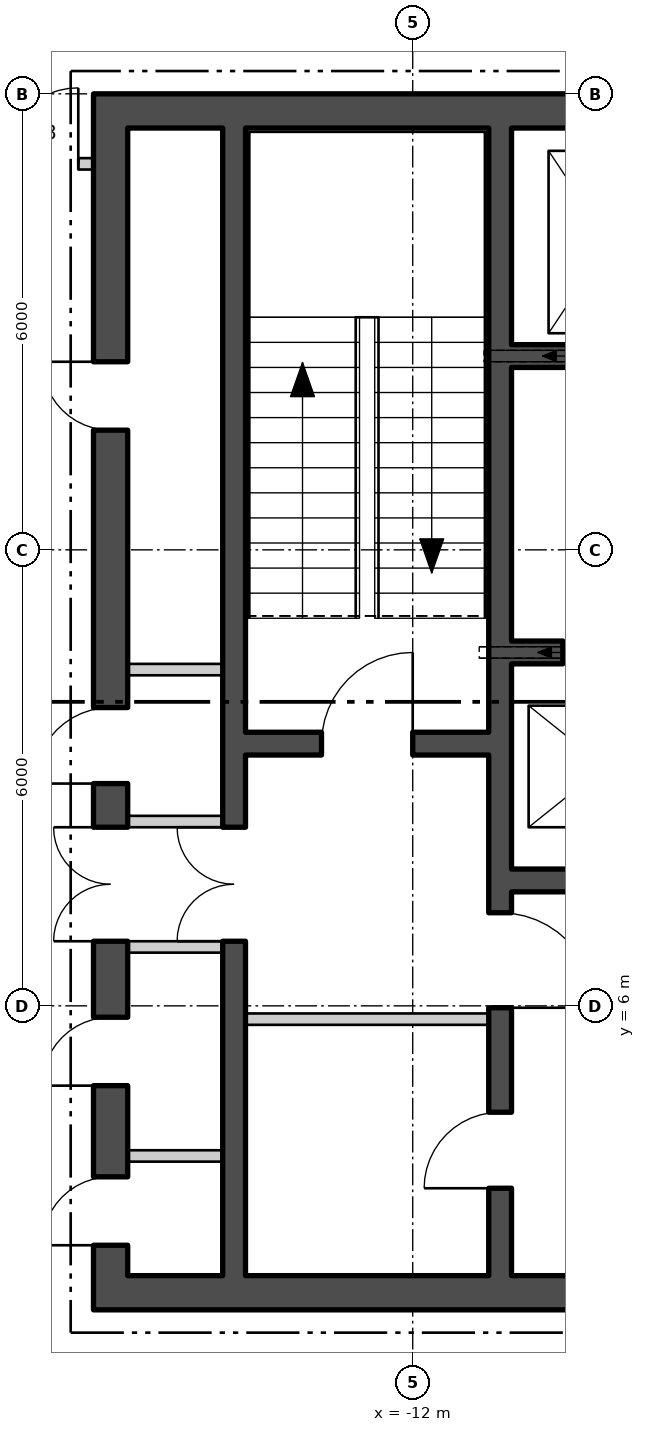
"""IFC4 building model, lengths in metres.
Left out: names, types, materials, properties, quantities, classifications, styles, units other than length and angle.
Written with IfcOpenShell. Run it as: python <this file> out.ifc"""

import sys

from ifc_helpers import new_model, si_unit, direction, frame, frame_2d, origin, place, context, subcontext, project, spatial, polyline, rectangle, outline, extrude, element, fill, save


model = new_model("IFC4")
c1 = context("Model", 3, precision=1e-05, world=origin(), true_north=direction((0.0, 1.0)))
c2 = subcontext(c1, "Body", "Model", "MODEL_VIEW")
j1 = project(units=[si_unit("LENGTHUNIT", "METRE"), si_unit("PLANEANGLEUNIT", "RADIAN")], contexts=[c1])
p1 = place(None, origin())
s1 = spatial("IfcSite", under=j1, at=p1, CompositionType="ELEMENT")
p2 = place(p1, origin())
s2 = spatial("IfcBuilding", under=s1, at=p2, CompositionType="ELEMENT")
p3 = place(p2, frame((0.0, 0.0, 216.0)))
s3 = spatial("IfcBuildingStorey", under=s2, at=p3, CompositionType="ELEMENT", Elevation=216.0)
p4 = place(p3, frame((-26.235, 14.155, -0.18), z_axis=(0.0, 0.0, 1.0), x_axis=(0.500000335318, -0.866025210188, 0.0)))
e1 = element("IfcWall", 1, at=p4, inside=s3, PredefinedType="SOLIDWALL", context=c2, shape_type="SweptSolid", body=[
    extrude(outline(polyline([(-0.13, -0.225), (45.88, -0.225), (45.62, 0.225), (0.13, 0.225), (-0.13, -0.225)])), origin(), (0.0, 0.0, 1.0), 3.68),
])
p5 = place(p4, frame((1.425, 0.0, 1.08)))
e2 = element("IfcOpeningElement", 2, at=p5, cuts=e1, PredefinedType="OPENING", context=c2, shape_type="SweptSolid", body=[
    extrude(rectangle(XDim=2.4, YDim=2.0, at=frame_2d((1.2, 1.0))), frame((0.0, 0.235, 0.0), z_axis=(0.0, -1.0, 0.0), x_axis=(1.0, 0.0, 0.0)), (0.0, 0.0, 1.0), 0.47),
])
p6 = place(p4, frame((5.895, 0.0, 1.08)))
e3 = element("IfcOpeningElement", 3, at=p6, cuts=e1, PredefinedType="OPENING", context=c2, shape_type="SweptSolid", body=[
    extrude(rectangle(XDim=2.4, YDim=2.0, at=frame_2d((1.2, 1.0))), frame((0.0, 0.235, 0.0), z_axis=(0.0, -1.0, 0.0), x_axis=(1.0, 0.0, 0.0)), (0.0, 0.0, 1.0), 0.47),
])
p7 = place(p4, frame((10.403, 0.0, 1.08)))
e4 = element("IfcOpeningElement", 4, at=p7, cuts=e1, PredefinedType="OPENING", context=c2, shape_type="SweptSolid", body=[
    extrude(rectangle(XDim=2.4, YDim=2.0, at=frame_2d((1.2, 1.0))), frame((0.0, 0.235, 0.0), z_axis=(0.0, -1.0, 0.0), x_axis=(1.0, 0.0, 0.0)), (0.0, 0.0, 1.0), 0.47),
])
p8 = place(p4, frame((19.421, 0.0, 1.08)))
e5 = element("IfcOpeningElement", 5, at=p8, cuts=e1, PredefinedType="OPENING", context=c2, shape_type="SweptSolid", body=[
    extrude(rectangle(XDim=2.4, YDim=2.0, at=frame_2d((1.2, 1.0))), frame((0.0, 0.235, 0.0), z_axis=(0.0, -1.0, 0.0), x_axis=(1.0, 0.0, 0.0)), (0.0, 0.0, 1.0), 0.47),
])
p9 = place(p4, frame((23.929, 0.0, 1.08)))
e6 = element("IfcOpeningElement", 6, at=p9, cuts=e1, PredefinedType="OPENING", context=c2, shape_type="SweptSolid", body=[
    extrude(rectangle(XDim=2.4, YDim=2.0, at=frame_2d((1.2, 1.0))), frame((0.0, 0.235, 0.0), z_axis=(0.0, -1.0, 0.0), x_axis=(1.0, 0.0, 0.0)), (0.0, 0.0, 1.0), 0.47),
])
p10 = place(p4, frame((28.438, 0.0, 1.08)))
e7 = element("IfcOpeningElement", 7, at=p10, cuts=e1, PredefinedType="OPENING", context=c2, shape_type="SweptSolid", body=[
    extrude(rectangle(XDim=2.4, YDim=2.0, at=frame_2d((1.2, 1.0))), frame((0.0, 0.235, 0.0), z_axis=(0.0, -1.0, 0.0), x_axis=(1.0, 0.0, 0.0)), (0.0, 0.0, 1.0), 0.47),
])
p11 = place(p4, frame((32.947, 0.0, 1.08)))
e8 = element("IfcOpeningElement", 8, at=p11, cuts=e1, PredefinedType="OPENING", context=c2, shape_type="SweptSolid", body=[
    extrude(rectangle(XDim=2.4, YDim=2.0, at=frame_2d((1.2, 1.0))), frame((0.0, 0.235, 0.0), z_axis=(0.0, -1.0, 0.0), x_axis=(1.0, 0.0, 0.0)), (0.0, 0.0, 1.0), 0.47),
])
p12 = place(p4, frame((41.925, 0.0, 1.08)))
e9 = element("IfcOpeningElement", 9, at=p12, cuts=e1, PredefinedType="OPENING", context=c2, shape_type="SweptSolid", body=[
    extrude(rectangle(XDim=2.4, YDim=2.0, at=frame_2d((1.2, 1.0))), frame((0.0, 0.235, 0.0), z_axis=(0.0, -1.0, 0.0), x_axis=(1.0, 0.0, 0.0)), (0.0, 0.0, 1.0), 0.47),
])
p13 = place(p3, frame((-16.2, 2.225, 0.0), z_axis=(0.0, 0.0, 1.0), x_axis=(1.0, 0.0, 0.0)))
e10 = element("IfcWall", 10, at=p13, inside=s3, PredefinedType="SHEAR", context=c2, shape_type="SweptSolid", body=[
    extrude(rectangle(XDim=32.4, YDim=0.45, at=frame_2d((16.2, 0.0))), origin(), (0.0, 0.0, 1.0), 3.7),
])
p14 = place(p13, frame((10.7, 0.0, 0.0)))
e11 = element("IfcOpeningElement", 11, at=p14, cuts=e10, PredefinedType="OPENING", context=c2, shape_type="SweptSolid", body=[
    extrude(rectangle(XDim=1.8, YDim=2.4, at=frame_2d((0.9, 1.2))), frame((0.0, 0.235, 0.0), z_axis=(0.0, -1.0, 0.0), x_axis=(1.0, 0.0, 0.0)), (0.0, 0.0, 1.0), 0.47),
])
p15 = place(p13, frame((20.7, 0.0, 0.0)))
e12 = element("IfcOpeningElement", 12, at=p15, cuts=e10, PredefinedType="OPENING", context=c2, shape_type="SweptSolid", body=[
    extrude(rectangle(XDim=1.8, YDim=2.4, at=frame_2d((0.9, 1.2))), frame((0.0, 0.235, 0.0), z_axis=(0.0, -1.0, 0.0), x_axis=(1.0, 0.0, 0.0)), (0.0, 0.0, 1.0), 0.47),
])
p16 = place(p3, frame((-16.2, 17.775, 0.0), z_axis=(0.0, 0.0, 1.0), x_axis=(1.0, 0.0, 0.0)))
e13 = element("IfcWall", 13, at=p16, inside=s3, PredefinedType="SHEAR", context=c2, shape_type="SweptSolid", body=[
    extrude(rectangle(XDim=32.4, YDim=0.45, at=frame_2d((16.2, 0.0))), origin(), (0.0, 0.0, 1.0), 3.7),
])
p17 = place(p3, frame((-15.975, 2.45, 0.0), z_axis=(0.0, 0.0, 1.0), x_axis=(0.0, 1.0, 0.0)))
e14 = element("IfcWall", 14, at=p17, inside=s3, PredefinedType="SHEAR", context=c2, shape_type="SweptSolid", body=[
    extrude(rectangle(XDim=15.1, YDim=0.45, at=frame_2d((7.55, 0.0))), origin(), (0.0, 0.0, 1.0), 3.7),
])
p18 = place(p17, frame((4.4, 0.0, 0.0)))
e15 = element("IfcOpeningElement", 15, at=p18, cuts=e14, PredefinedType="OPENING", context=c2, shape_type="SweptSolid", body=[
    extrude(rectangle(XDim=1.5, YDim=2.1, at=frame_2d((0.75, 1.05))), frame((0.0, 0.235, 0.0), z_axis=(0.0, -1.0, 0.0), x_axis=(1.0, 0.0, 0.0)), (0.0, 0.0, 1.0), 0.47),
])
p19 = place(p17, frame((0.4, 0.0, 0.0)))
e16 = element("IfcOpeningElement", 16, at=p19, cuts=e14, PredefinedType="OPENING", context=c2, shape_type="SweptSolid", body=[
    extrude(rectangle(XDim=0.9, YDim=2.1, at=frame_2d((0.45, 1.05))), frame((0.0, 0.235, 0.0), z_axis=(0.0, -1.0, 0.0), x_axis=(1.0, 0.0, 0.0)), (0.0, 0.0, 1.0), 0.47),
])
p20 = place(p17, frame((2.5, 0.0, 0.0)))
e17 = element("IfcOpeningElement", 17, at=p20, cuts=e14, PredefinedType="OPENING", context=c2, shape_type="SweptSolid", body=[
    extrude(rectangle(XDim=0.9, YDim=2.1, at=frame_2d((0.45, 1.05))), frame((0.0, 0.235, 0.0), z_axis=(0.0, -1.0, 0.0), x_axis=(1.0, 0.0, 0.0)), (0.0, 0.0, 1.0), 0.47),
])
p21 = place(p17, frame((6.475, 0.0, 0.0)))
e18 = element("IfcOpeningElement", 18, at=p21, cuts=e14, PredefinedType="OPENING", context=c2, shape_type="SweptSolid", body=[
    extrude(rectangle(XDim=1.0, YDim=2.1, at=frame_2d((0.5, 1.05))), frame((0.0, 0.235, 0.0), z_axis=(0.0, -1.0, 0.0), x_axis=(1.0, 0.0, 0.0)), (0.0, 0.0, 1.0), 0.47),
])
p22 = place(p17, frame((11.125, 0.0, 0.0)))
e19 = element("IfcOpeningElement", 19, at=p22, cuts=e14, PredefinedType="OPENING", context=c2, shape_type="SweptSolid", body=[
    extrude(rectangle(XDim=0.9, YDim=2.1, at=frame_2d((0.45, 1.05))), frame((0.0, 0.235, 0.0), z_axis=(0.0, -1.0, 0.0), x_axis=(1.0, 0.0, 0.0)), (0.0, 0.0, 1.0), 0.47),
])
p23 = place(p3, frame((-10.85, 2.45, 0.0), z_axis=(0.0, 0.0, 1.0), x_axis=(0.0, 1.0, 0.0)))
e20 = element("IfcWall", 20, at=p23, inside=s3, PredefinedType="SHEAR", context=c2, shape_type="SweptSolid", body=[
    extrude(rectangle(XDim=15.1, YDim=0.3, at=frame_2d((7.55, 0.0))), origin(), (0.0, 0.0, 1.0), 3.7),
])
p24 = place(p23, frame((3.525, 0.0, 0.0)))
e21 = element("IfcOpeningElement", 21, at=p24, cuts=e20, PredefinedType="OPENING", context=c2, shape_type="SweptSolid", body=[
    extrude(rectangle(XDim=1.25, YDim=2.1, at=frame_2d((0.625, 1.05))), frame((0.0, 0.16, 0.0), z_axis=(0.0, -1.0, 0.0), x_axis=(1.0, 0.0, 0.0)), (0.0, 0.0, 1.0), 0.32),
])
p25 = place(p23, frame((1.15, 0.0, 0.0)))
e22 = element("IfcOpeningElement", 22, at=p25, cuts=e20, PredefinedType="OPENING", context=c2, shape_type="SweptSolid", body=[
    extrude(rectangle(XDim=1.0, YDim=2.1, at=frame_2d((0.5, 1.05))), frame((0.0, 0.16, 0.0), z_axis=(0.0, -1.0, 0.0), x_axis=(1.0, 0.0, 0.0)), (0.0, 0.0, 1.0), 0.32),
])
p26 = place(p3, frame((-14.35, 2.45, 0.0), z_axis=(0.0, 0.0, 1.0), x_axis=(0.0, 1.0, 0.0)))
e23 = element("IfcWall", 23, at=p26, inside=s3, PredefinedType="SHEAR", context=c2, shape_type="SweptSolid", body=[
    extrude(rectangle(XDim=15.1, YDim=0.3, at=frame_2d((7.55, 0.0))), origin(), (0.0, 0.0, 1.0), 3.7),
])
p27 = place(p26, frame((4.4, 0.0, 0.0)))
e24 = element("IfcOpeningElement", 24, at=p27, cuts=e23, PredefinedType="OPENING", context=c2, shape_type="SweptSolid", body=[
    extrude(rectangle(XDim=1.5, YDim=2.1, at=frame_2d((0.75, 1.05))), frame((0.0, 0.16, 0.0), z_axis=(0.0, -1.0, 0.0), x_axis=(1.0, 0.0, 0.0)), (0.0, 0.0, 1.0), 0.32),
])
p28 = place(p3, frame((-14.2, 9.45, 0.0), z_axis=(0.0, 0.0, 1.0), x_axis=(1.0, 0.0, 0.0)))
e25 = element("IfcWall", 25, at=p28, inside=s3, PredefinedType="SHEAR", context=c2, shape_type="SweptSolid", body=[
    extrude(rectangle(XDim=3.2, YDim=0.3, at=frame_2d((1.6, 0.0))), origin(), (0.0, 0.0, 1.0), 3.7),
])
p29 = place(p28, frame((1.0, 0.0, 0.0)))
e26 = element("IfcOpeningElement", 26, at=p29, cuts=e25, PredefinedType="OPENING", context=c2, shape_type="SweptSolid", body=[
    extrude(rectangle(XDim=1.2, YDim=2.1, at=frame_2d((0.6, 1.05))), frame((0.0, 0.16, 0.0), z_axis=(0.0, -1.0, 0.0), x_axis=(1.0, 0.0, 0.0)), (0.0, 0.0, 1.0), 0.32),
])
p30 = place(p3, frame((-10.7, 14.55, 0.0), z_axis=(0.0, 0.0, 1.0), x_axis=(1.0, 0.0, 0.0)))
e27 = element("IfcWall", 27, at=p30, inside=s3, PredefinedType="SHEAR", context=c2, shape_type="SweptSolid", body=[
    extrude(rectangle(XDim=21.4, YDim=0.3, at=frame_2d((10.7, 0.0))), origin(), (0.0, 0.0, 1.0), 3.7),
])
p31 = place(p30, frame((0.738, 0.0, 0.0)))
e28 = element("IfcOpeningElement", 28, at=p31, cuts=e27, PredefinedType="OPENING", context=c2, shape_type="SweptSolid", body=[
    extrude(rectangle(XDim=1.1, YDim=2.1, at=frame_2d((0.55, 1.05))), frame((0.0, 0.16, 0.0), z_axis=(0.0, -1.0, 0.0), x_axis=(1.0, 0.0, 0.0)), (0.0, 0.0, 1.0), 0.32),
])
p32 = place(p30, frame((3.462, 0.0, 0.0)))
e29 = element("IfcOpeningElement", 29, at=p32, cuts=e27, PredefinedType="OPENING", context=c2, shape_type="SweptSolid", body=[
    extrude(rectangle(XDim=1.1, YDim=2.1, at=frame_2d((0.55, 1.05))), frame((0.0, 0.16, 0.0), z_axis=(0.0, -1.0, 0.0), x_axis=(1.0, 0.0, 0.0)), (0.0, 0.0, 1.0), 0.32),
])
p33 = place(p30, frame((6.138, 0.0, 0.0)))
e30 = element("IfcOpeningElement", 30, at=p33, cuts=e27, PredefinedType="OPENING", context=c2, shape_type="SweptSolid", body=[
    extrude(rectangle(XDim=1.1, YDim=2.1, at=frame_2d((0.55, 1.05))), frame((0.0, 0.16, 0.0), z_axis=(0.0, -1.0, 0.0), x_axis=(1.0, 0.0, 0.0)), (0.0, 0.0, 1.0), 0.32),
])
p34 = place(p30, frame((8.812, 0.0, 0.0)))
e31 = element("IfcOpeningElement", 31, at=p34, cuts=e27, PredefinedType="OPENING", context=c2, shape_type="SweptSolid", body=[
    extrude(rectangle(XDim=1.1, YDim=2.1, at=frame_2d((0.55, 1.05))), frame((0.0, 0.16, 0.0), z_axis=(0.0, -1.0, 0.0), x_axis=(1.0, 0.0, 0.0)), (0.0, 0.0, 1.0), 0.32),
])
p35 = place(p30, frame((19.562, 0.0, 0.0)))
e32 = element("IfcOpeningElement", 32, at=p35, cuts=e27, PredefinedType="OPENING", context=c2, shape_type="SweptSolid", body=[
    extrude(rectangle(XDim=1.1, YDim=2.1, at=frame_2d((0.55, 1.05))), frame((0.0, 0.16, 0.0), z_axis=(0.0, -1.0, 0.0), x_axis=(1.0, 0.0, 0.0)), (0.0, 0.0, 1.0), 0.32),
])
p36 = place(p30, frame((12.875, 0.0, 0.0)))
e33 = element("IfcOpeningElement", 33, at=p36, cuts=e27, PredefinedType="OPENING", context=c2, shape_type="SweptSolid", body=[
    extrude(rectangle(XDim=1.0, YDim=2.1, at=frame_2d((0.5, 1.05))), frame((0.0, 0.16, 0.0), z_axis=(0.0, -1.0, 0.0), x_axis=(1.0, 0.0, 0.0)), (0.0, 0.0, 1.0), 0.32),
])
p37 = place(p30, frame((16.887, 0.0, 0.0)))
e34 = element("IfcOpeningElement", 34, at=p37, cuts=e27, PredefinedType="OPENING", context=c2, shape_type="SweptSolid", body=[
    extrude(rectangle(XDim=1.0, YDim=2.1, at=frame_2d((0.5, 1.05))), frame((0.0, 0.16, 0.0), z_axis=(0.0, -1.0, 0.0), x_axis=(1.0, 0.0, 0.0)), (0.0, 0.0, 1.0), 0.32),
])
p38 = place(p3, frame((-10.7, 10.65, 0.0), z_axis=(0.0, 0.0, 1.0), x_axis=(1.0, 0.0, 0.0)))
e35 = element("IfcWall", 35, at=p38, inside=s3, PredefinedType="SHEAR", context=c2, shape_type="SweptSolid", body=[
    extrude(rectangle(XDim=10.3, YDim=0.3, at=frame_2d((5.15, 0.0))), origin(), (0.0, 0.0, 1.0), 3.7),
])
p39 = place(p38, frame((0.675, 0.0, 0.0)))
e36 = element("IfcOpeningElement", 36, at=p39, cuts=e35, PredefinedType="OPENING", context=c2, shape_type="SweptSolid", body=[
    extrude(rectangle(XDim=1.1, YDim=2.1, at=frame_2d((0.55, 1.05))), frame((0.0, 0.16, 0.0), z_axis=(0.0, -1.0, 0.0), x_axis=(1.0, 0.0, 0.0)), (0.0, 0.0, 1.0), 0.32),
])
p40 = place(p38, frame((3.275, 0.0, 0.0)))
e37 = element("IfcOpeningElement", 37, at=p40, cuts=e35, PredefinedType="OPENING", context=c2, shape_type="SweptSolid", body=[
    extrude(rectangle(XDim=1.1, YDim=2.1, at=frame_2d((0.55, 1.05))), frame((0.0, 0.16, 0.0), z_axis=(0.0, -1.0, 0.0), x_axis=(1.0, 0.0, 0.0)), (0.0, 0.0, 1.0), 0.32),
])
p41 = place(p38, frame((5.825, 0.0, 0.0)))
e38 = element("IfcOpeningElement", 38, at=p41, cuts=e35, PredefinedType="OPENING", context=c2, shape_type="SweptSolid", body=[
    extrude(rectangle(XDim=1.1, YDim=2.1, at=frame_2d((0.55, 1.05))), frame((0.0, 0.16, 0.0), z_axis=(0.0, -1.0, 0.0), x_axis=(1.0, 0.0, 0.0)), (0.0, 0.0, 1.0), 0.32),
])
p42 = place(p38, frame((8.425, 0.0, 0.0)))
e39 = element("IfcOpeningElement", 39, at=p42, cuts=e35, PredefinedType="OPENING", context=c2, shape_type="SweptSolid", body=[
    extrude(rectangle(XDim=1.0, YDim=2.1, at=frame_2d((0.5, 1.05))), frame((0.0, 0.16, 0.0), z_axis=(0.0, -1.0, 0.0), x_axis=(1.0, 0.0, 0.0)), (0.0, 0.0, 1.0), 0.32),
])
p43 = place(p3, frame((-10.7, 7.65, 0.0), z_axis=(0.0, 0.0, 1.0), x_axis=(1.0, 0.0, 0.0)))
e40 = element("IfcWall", 40, at=p43, inside=s3, PredefinedType="SHEAR", context=c2, shape_type="SweptSolid", body=[
    extrude(rectangle(XDim=10.3, YDim=0.3, at=frame_2d((5.15, 0.0))), origin(), (0.0, 0.0, 1.0), 3.7),
])
p44 = place(p3, frame((-14.2, 5.825, 0.0), z_axis=(0.0, 0.0, 1.0), x_axis=(1.0, 0.0, 0.0)))
e41 = element("IfcWall", 41, at=p44, inside=s3, PredefinedType="PARTITIONING", context=c2, shape_type="SweptSolid", body=[
    extrude(rectangle(XDim=3.2, YDim=0.15, at=frame_2d((1.6, 0.0))), origin(), (0.0, 0.0, 1.0), 3.7),
])
for number, where, z_axis, x_axis in (
    (42, (-15.75, 6.775, 0.0), (0.0, 0.0, 1.0), (1.0, 0.0, 0.0)),
    (43, (-15.75, 8.425, 0.0), (0.0, 0.0, 1.0), (1.0, 0.0, 0.0)),
    (44, (-15.75, 4.025, 0.0), (0.0, 0.0, 1.0), (1.0, 0.0, 0.0)),
    (45, (-15.75, 10.424, 0.0), (0.0, 0.0, 1.0), (1.0, 0.0, 0.0)),
):
    element("IfcWall", number, at=place(p3, frame(where, z_axis=z_axis, x_axis=x_axis)), inside=s3, PredefinedType="PARTITIONING", context=c2, shape_type="SweptSolid", body=[
        extrude(rectangle(XDim=1.25, YDim=0.15, at=frame_2d((0.625, 0.0))), origin(), (0.0, 0.0, 1.0), 3.7),
    ])
p45 = place(p3, frame((-17.959, 17.079, 0.0), z_axis=(0.0, 0.0, 1.0), x_axis=(1.0, 0.0, 0.0)))
e46 = element("IfcWall", 46, at=p45, inside=s3, PredefinedType="PARTITIONING", context=c2, shape_type="SweptSolid", body=[
    extrude(rectangle(XDim=1.759, YDim=0.15, at=frame_2d((0.879, 0.0))), origin(), (0.0, 0.0, 1.0), 3.7),
])
p46 = place(p45, frame((0.559, 0.0, 0.0)))
e47 = element("IfcOpeningElement", 47, at=p46, cuts=e46, PredefinedType="OPENING", context=c2, shape_type="SweptSolid", body=[
    extrude(rectangle(XDim=1.0, YDim=2.1, at=frame_2d((0.5, 1.05))), frame((0.0, 0.085, 0.0), z_axis=(0.0, -1.0, 0.0), x_axis=(1.0, 0.0, 0.0)), (0.0, 0.0, 1.0), 0.17),
])
p47 = place(p39, origin())
e48 = element("IfcDoor", 48, at=p47, inside=s3, OperationType="SLIDING_TO_LEFT", PredefinedType="DOOR", context=c2, shape_type="SweptSolid", body=[
    extrude(rectangle(XDim=1.1, YDim=2.1, at=frame_2d((0.55, 1.05))), frame((0.0, 0.025, 0.0), z_axis=(0.0, -1.0, 0.0), x_axis=(1.0, 0.0, 0.0)), (0.0, 0.0, 1.0), 0.05),
])
fill(e36, e48)
p48 = place(p29, origin())
e49 = element("IfcDoor", 49, at=p48, inside=s3, OperationType="SINGLE_SWING_LEFT", PredefinedType="DOOR", context=c2, shape_type="SweptSolid", body=[
    extrude(rectangle(XDim=1.2, YDim=2.1, at=frame_2d((0.6, 1.05))), frame((0.0, 0.025, 0.0), z_axis=(0.0, -1.0, 0.0), x_axis=(1.0, 0.0, 0.0)), (0.0, 0.0, 1.0), 0.05),
])
fill(e26, e49)
p49 = place(p24, origin())
e50 = element("IfcDoor", 50, at=p49, inside=s3, OperationType="SINGLE_SWING_LEFT", PredefinedType="DOOR", context=c2, shape_type="SweptSolid", body=[
    extrude(rectangle(XDim=1.25, YDim=2.1, at=frame_2d((0.625, 1.05))), frame((0.0, 0.025, 0.0), z_axis=(0.0, -1.0, 0.0), x_axis=(1.0, 0.0, 0.0)), (0.0, 0.0, 1.0), 0.05),
])
fill(e21, e50)
p50 = place(p25, origin())
e51 = element("IfcDoor", 51, at=p50, inside=s3, OperationType="SINGLE_SWING_RIGHT", PredefinedType="DOOR", context=c2, shape_type="SweptSolid", body=[
    extrude(rectangle(XDim=1.0, YDim=2.1, at=frame_2d((0.5, 1.05))), frame((0.0, 0.025, 0.0), z_axis=(0.0, -1.0, 0.0), x_axis=(1.0, 0.0, 0.0)), (0.0, 0.0, 1.0), 0.05),
])
fill(e22, e51)
p51 = place(p27, origin())
e52 = element("IfcDoor", 52, at=p51, inside=s3, OperationType="DOUBLE_DOOR_SINGLE_SWING", PredefinedType="DOOR", context=c2, shape_type="SweptSolid", body=[
    extrude(rectangle(XDim=1.5, YDim=2.1, at=frame_2d((0.75, 1.05))), frame((0.0, 0.025, 0.0), z_axis=(0.0, -1.0, 0.0), x_axis=(1.0, 0.0, 0.0)), (0.0, 0.0, 1.0), 0.05),
])
fill(e24, e52)
p52 = place(p18, origin())
e53 = element("IfcDoor", 53, at=p52, inside=s3, OperationType="DOUBLE_DOOR_SINGLE_SWING", PredefinedType="DOOR", context=c2, shape_type="SweptSolid", body=[
    extrude(rectangle(XDim=1.5, YDim=2.1, at=frame_2d((0.75, 1.05))), frame((0.0, 0.025, 0.0), z_axis=(0.0, -1.0, 0.0), x_axis=(1.0, 0.0, 0.0)), (0.0, 0.0, 1.0), 0.05),
])
fill(e15, e53)
p53 = place(p19, origin())
e54 = element("IfcDoor", 54, at=p53, inside=s3, OperationType="SINGLE_SWING_RIGHT", PredefinedType="DOOR", context=c2, shape_type="SweptSolid", body=[
    extrude(rectangle(XDim=0.9, YDim=2.1, at=frame_2d((0.45, 1.05))), frame((0.0, 0.025, 0.0), z_axis=(0.0, -1.0, 0.0), x_axis=(1.0, 0.0, 0.0)), (0.0, 0.0, 1.0), 0.05),
])
fill(e16, e54)
p54 = place(p20, origin())
e55 = element("IfcDoor", 55, at=p54, inside=s3, OperationType="SINGLE_SWING_RIGHT", PredefinedType="DOOR", context=c2, shape_type="SweptSolid", body=[
    extrude(rectangle(XDim=0.9, YDim=2.1, at=frame_2d((0.45, 1.05))), frame((0.0, 0.025, 0.0), z_axis=(0.0, -1.0, 0.0), x_axis=(1.0, 0.0, 0.0)), (0.0, 0.0, 1.0), 0.05),
])
fill(e17, e55)
p55 = place(p21, origin())
e56 = element("IfcDoor", 56, at=p55, inside=s3, OperationType="SINGLE_SWING_RIGHT", PredefinedType="DOOR", context=c2, shape_type="SweptSolid", body=[
    extrude(rectangle(XDim=1.0, YDim=2.1, at=frame_2d((0.5, 1.05))), frame((0.0, 0.025, 0.0), z_axis=(0.0, -1.0, 0.0), x_axis=(1.0, 0.0, 0.0)), (0.0, 0.0, 1.0), 0.05),
])
fill(e18, e56)
p56 = place(p22, origin())
e57 = element("IfcDoor", 57, at=p56, inside=s3, OperationType="SINGLE_SWING_LEFT", PredefinedType="DOOR", context=c2, shape_type="SweptSolid", body=[
    extrude(rectangle(XDim=0.9, YDim=2.1, at=frame_2d((0.45, 1.05))), frame((0.0, 0.025, 0.0), z_axis=(0.0, -1.0, 0.0), x_axis=(1.0, 0.0, 0.0)), (0.0, 0.0, 1.0), 0.05),
])
fill(e19, e57)
p57 = place(p46, origin())
e58 = element("IfcDoor", 58, at=p57, inside=s3, OperationType="SINGLE_SWING_LEFT", PredefinedType="DOOR", context=c2, shape_type="SweptSolid", body=[
    extrude(rectangle(XDim=1.0, YDim=2.1, at=frame_2d((0.5, 1.05))), frame((0.0, 0.025, 0.0), z_axis=(0.0, -1.0, 0.0), x_axis=(1.0, 0.0, 0.0)), (0.0, 0.0, 1.0), 0.05),
])
fill(e47, e58)
save(model, sys.argv[1])
